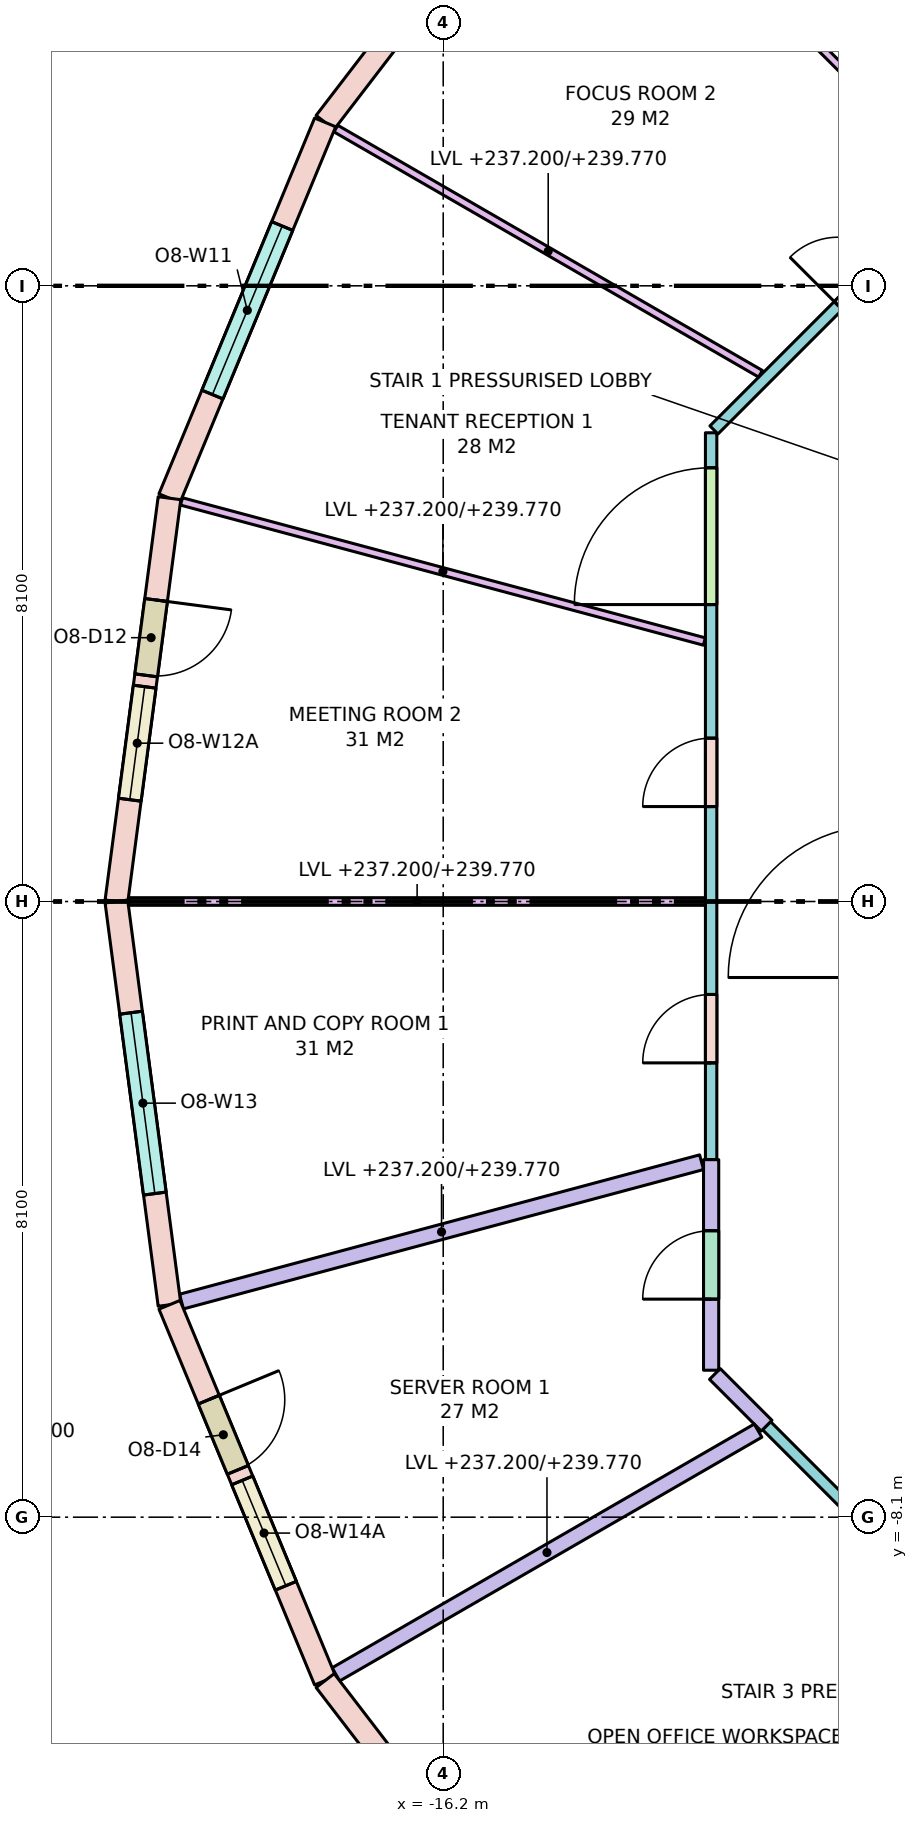
"""IFC4 building model, lengths in metres.
Left out: names, types, materials, properties, quantities, classifications, styles, units other than length and angle.
Written with IfcOpenShell. Run it as: python <this file> out.ifc"""

import sys

from ifc_helpers import new_model, si_unit, direction, frame, frame_2d, origin, place, context, subcontext, project, spatial, rectangle, extrude, element, fill, save


model = new_model("IFC4")
c1 = context("Model", 3, precision=1e-05, world=origin(), true_north=direction((0.0, 1.0)))
c2 = subcontext(c1, "Body", "Model", "MODEL_VIEW")
j1 = project(units=[si_unit("LENGTHUNIT", "METRE"), si_unit("PLANEANGLEUNIT", "RADIAN")], contexts=[c1])
p1 = place(None, origin())
s1 = spatial("IfcSite", under=j1, at=p1, CompositionType="ELEMENT")
p2 = place(p1, origin())
s2 = spatial("IfcBuilding", under=s1, at=p2, CompositionType="ELEMENT")
p3 = place(p2, frame((0.0, 0.0, 237.2)))
s3 = spatial("IfcBuildingStorey", under=s2, at=p3, CompositionType="ELEMENT", Elevation=237.2)
p4 = place(p3, frame((-14.496, 14.496, 0.0), z_axis=(0.0, 0.0, 1.0), x_axis=(-0.60876670321, -0.793349293227, 0.0)))
e1 = element("IfcWall", 1, at=p4, inside=s3, PredefinedType="STANDARD", context=c2, shape_type="SweptSolid", body=[
    extrude(rectangle(XDim=5.352, YDim=0.3, at=frame_2d((2.676, 0.0))), origin(), (0.0, 0.0, 1.0), 3.42),
])
p5 = place(p4, frame((1.351, 0.0, 0.0)))
e2 = element("IfcOpeningElement", 2, at=p5, cuts=e1, PredefinedType="OPENING", context=c2, shape_type="SweptSolid", body=[
    extrude(rectangle(XDim=1.0, YDim=2.4, at=frame_2d((0.5, 1.2))), frame((0.0, 0.16, 0.0), z_axis=(0.0, -1.0, 0.0), x_axis=(1.0, 0.0, 0.0)), (0.0, 0.0, 1.0), 0.32),
])
p6 = place(p4, frame((2.501, 0.0, 0.8)))
e3 = element("IfcOpeningElement", 3, at=p6, cuts=e1, PredefinedType="OPENING", context=c2, shape_type="SweptSolid", body=[
    extrude(rectangle(XDim=1.5, YDim=2.4, at=frame_2d((0.75, 1.2))), frame((0.0, 0.16, 0.0), z_axis=(0.0, -1.0, 0.0), x_axis=(1.0, 0.0, 0.0)), (0.0, 0.0, 1.0), 0.32),
])
p7 = place(p3, frame((-17.753, 10.25, 0.0), z_axis=(0.0, 0.0, 1.0), x_axis=(-0.382713071139, -0.923867255172, 0.0)))
e4 = element("IfcWall", 4, at=p7, inside=s3, PredefinedType="STANDARD", context=c2, shape_type="SweptSolid", body=[
    extrude(rectangle(XDim=5.352, YDim=0.3, at=frame_2d((2.676, 0.0))), origin(), (0.0, 0.0, 1.0), 3.42),
])
p8 = place(p7, frame((1.476, 0.0, 0.8)))
e5 = element("IfcOpeningElement", 5, at=p8, cuts=e4, PredefinedType="OPENING", context=c2, shape_type="SweptSolid", body=[
    extrude(rectangle(XDim=2.4, YDim=2.4, at=frame_2d((1.2, 1.2))), frame((0.0, 0.16, 0.0), z_axis=(0.0, -1.0, 0.0), x_axis=(1.0, 0.0, 0.0)), (0.0, 0.0, 1.0), 0.32),
])
p9 = place(p3, frame((-19.802, 5.306, 0.0), z_axis=(0.0, 0.0, 1.0), x_axis=(-0.130517056518, -0.991446064069, 0.0)))
e6 = element("IfcWall", 6, at=p9, inside=s3, PredefinedType="STANDARD", context=c2, shape_type="SweptSolid", body=[
    extrude(rectangle(XDim=5.352, YDim=0.3, at=frame_2d((2.676, 0.0))), origin(), (0.0, 0.0, 1.0), 3.42),
])
p10 = place(p9, frame((1.351, 0.0, 0.0)))
e7 = element("IfcOpeningElement", 7, at=p10, cuts=e6, PredefinedType="OPENING", context=c2, shape_type="SweptSolid", body=[
    extrude(rectangle(XDim=1.0, YDim=2.4, at=frame_2d((0.5, 1.2))), frame((0.0, 0.16, 0.0), z_axis=(0.0, -1.0, 0.0), x_axis=(1.0, 0.0, 0.0)), (0.0, 0.0, 1.0), 0.32),
])
p11 = place(p9, frame((2.501, 0.0, 0.8)))
e8 = element("IfcOpeningElement", 8, at=p11, cuts=e6, PredefinedType="OPENING", context=c2, shape_type="SweptSolid", body=[
    extrude(rectangle(XDim=1.5, YDim=2.4, at=frame_2d((0.75, 1.2))), frame((0.0, 0.16, 0.0), z_axis=(0.0, -1.0, 0.0), x_axis=(1.0, 0.0, 0.0)), (0.0, 0.0, 1.0), 0.32),
])
p12 = place(p3, frame((-20.5, 0.0, 0.0), z_axis=(0.0, 0.0, 1.0), x_axis=(0.130517056518, -0.991446064069, 0.0)))
e9 = element("IfcWall", 9, at=p12, inside=s3, PredefinedType="STANDARD", context=c2, shape_type="SweptSolid", body=[
    extrude(rectangle(XDim=5.352, YDim=0.3, at=frame_2d((2.676, 0.0))), origin(), (0.0, 0.0, 1.0), 3.42),
])
p13 = place(p12, frame((1.476, 0.0, 0.8)))
e10 = element("IfcOpeningElement", 10, at=p13, cuts=e9, PredefinedType="OPENING", context=c2, shape_type="SweptSolid", body=[
    extrude(rectangle(XDim=2.4, YDim=2.4, at=frame_2d((1.2, 1.2))), frame((0.0, 0.16, 0.0), z_axis=(0.0, -1.0, 0.0), x_axis=(1.0, 0.0, 0.0)), (0.0, 0.0, 1.0), 0.32),
])
p14 = place(p3, frame((-19.802, -5.306, 0.0), z_axis=(0.0, 0.0, 1.0), x_axis=(0.382713071139, -0.923867255172, 0.0)))
e11 = element("IfcWall", 11, at=p14, inside=s3, PredefinedType="STANDARD", context=c2, shape_type="SweptSolid", body=[
    extrude(rectangle(XDim=5.352, YDim=0.3, at=frame_2d((2.676, 0.0))), origin(), (0.0, 0.0, 1.0), 3.42),
])
p15 = place(p14, frame((1.351, 0.0, 0.0)))
e12 = element("IfcOpeningElement", 12, at=p15, cuts=e11, PredefinedType="OPENING", context=c2, shape_type="SweptSolid", body=[
    extrude(rectangle(XDim=1.0, YDim=2.4, at=frame_2d((0.5, 1.2))), frame((0.0, 0.16, 0.0), z_axis=(0.0, -1.0, 0.0), x_axis=(1.0, 0.0, 0.0)), (0.0, 0.0, 1.0), 0.32),
])
p16 = place(p14, frame((2.501, 0.0, 0.8)))
e13 = element("IfcOpeningElement", 13, at=p16, cuts=e11, PredefinedType="OPENING", context=c2, shape_type="SweptSolid", body=[
    extrude(rectangle(XDim=1.5, YDim=2.4, at=frame_2d((0.75, 1.2))), frame((0.0, 0.16, 0.0), z_axis=(0.0, -1.0, 0.0), x_axis=(1.0, 0.0, 0.0)), (0.0, 0.0, 1.0), 0.32),
])
p17 = place(p3, frame((-17.753, -10.25, 0.0), z_axis=(0.0, 0.0, 1.0), x_axis=(0.60876670321, -0.793349293227, 0.0)))
e14 = element("IfcWall", 14, at=p17, inside=s3, PredefinedType="STANDARD", context=c2, shape_type="SweptSolid", body=[
    extrude(rectangle(XDim=5.352, YDim=0.3, at=frame_2d((2.676, 0.0))), origin(), (0.0, 0.0, 1.0), 3.42),
])
p18 = place(p17, frame((1.476, 0.0, 0.8)))
e15 = element("IfcOpeningElement", 15, at=p18, cuts=e14, PredefinedType="OPENING", context=c2, shape_type="SweptSolid", body=[
    extrude(rectangle(XDim=2.4, YDim=2.4, at=frame_2d((1.2, 1.2))), frame((0.0, 0.16, 0.0), z_axis=(0.0, -1.0, 0.0), x_axis=(1.0, 0.0, 0.0)), (0.0, 0.0, 1.0), 0.32),
])
p19 = place(p3, frame((-8.204, -10.638, 0.0), z_axis=(0.0, 0.0, 1.0), x_axis=(-0.707106781187, 0.707106781187, 0.0)))
e16 = element("IfcWall", 16, at=p19, inside=s3, PredefinedType="PARTITIONING", context=c2, shape_type="SweptSolid", body=[
    extrude(rectangle(XDim=5.291, YDim=0.15, at=frame_2d((2.646, 0.0))), origin(), (0.0, 0.0, 1.0), 2.57),
])
p20 = place(p3, frame((-11.945, -6.896, 0.0), z_axis=(0.0, 0.0, 1.0), x_axis=(-0.707106781187, 0.707106781187, 0.0)))
e17 = element("IfcWall", 17, at=p20, inside=s3, PredefinedType="PARTITIONING", context=c2, shape_type="SweptSolid", body=[
    extrude(rectangle(XDim=0.962, YDim=0.2, at=frame_2d((0.481, 0.0))), origin(), (0.0, 0.0, 1.0), 2.57),
])
p21 = place(p3, frame((-12.675, -6.167, 0.0), z_axis=(0.0, 0.0, 1.0), x_axis=(0.0, 1.0, 0.0)))
e18 = element("IfcWall", 18, at=p21, inside=s3, PredefinedType="PARTITIONING", context=c2, shape_type="SweptSolid", body=[
    extrude(rectangle(XDim=2.77, YDim=0.2, at=frame_2d((1.385, 0.0))), origin(), (0.0, 0.0, 1.0), 2.57),
])
p22 = place(p21, frame((0.935, 0.0, 0.0)))
e19 = element("IfcOpeningElement", 19, at=p22, cuts=e18, PredefinedType="OPENING", context=c2, shape_type="SweptSolid", body=[
    extrude(rectangle(XDim=0.9, YDim=2.1, at=frame_2d((0.45, 1.05))), frame((0.0, 0.11, 0.0), z_axis=(0.0, -1.0, 0.0), x_axis=(1.0, 0.0, 0.0)), (0.0, 0.0, 1.0), 0.22),
])
p23 = place(p3, frame((-12.675, -3.396, 0.0), z_axis=(0.0, 0.0, 1.0), x_axis=(0.0, 1.0, 0.0)))
e20 = element("IfcWall", 20, at=p23, inside=s3, PredefinedType="PARTITIONING", context=c2, shape_type="SweptSolid", body=[
    extrude(rectangle(XDim=9.563, YDim=0.15, at=frame_2d((4.781, 0.0))), origin(), (0.0, 0.0, 1.0), 2.57),
])
p24 = place(p23, frame((7.303, 0.0, 0.0)))
e21 = element("IfcOpeningElement", 21, at=p24, cuts=e20, PredefinedType="OPENING", context=c2, shape_type="SweptSolid", body=[
    extrude(rectangle(XDim=1.8, YDim=2.1, at=frame_2d((0.9, 1.05))), frame((0.0, 0.085, 0.0), z_axis=(0.0, -1.0, 0.0), x_axis=(1.0, 0.0, 0.0)), (0.0, 0.0, 1.0), 0.17),
])
p25 = place(p23, frame((4.645, 0.0, 0.0)))
e22 = element("IfcOpeningElement", 22, at=p25, cuts=e20, PredefinedType="OPENING", context=c2, shape_type="SweptSolid", body=[
    extrude(rectangle(XDim=0.9, YDim=2.1, at=frame_2d((0.45, 1.05))), frame((0.0, 0.085, 0.0), z_axis=(0.0, -1.0, 0.0), x_axis=(1.0, 0.0, 0.0)), (0.0, 0.0, 1.0), 0.17),
])
p26 = place(p23, frame((1.273, 0.0, 0.0)))
e23 = element("IfcOpeningElement", 23, at=p26, cuts=e20, PredefinedType="OPENING", context=c2, shape_type="SweptSolid", body=[
    extrude(rectangle(XDim=0.9, YDim=2.1, at=frame_2d((0.45, 1.05))), frame((0.0, 0.085, 0.0), z_axis=(0.0, -1.0, 0.0), x_axis=(1.0, 0.0, 0.0)), (0.0, 0.0, 1.0), 0.17),
])
p27 = place(p3, frame((-12.638, 6.204, 0.0), z_axis=(0.0, 0.0, 1.0), x_axis=(0.707106781187, 0.707106781187, 0.0)))
e24 = element("IfcWall", 24, at=p27, inside=s3, PredefinedType="PARTITIONING", context=c2, shape_type="SweptSolid", body=[
    extrude(rectangle(XDim=6.271, YDim=0.15, at=frame_2d((3.135, 0.0))), origin(), (0.0, 0.0, 1.0), 2.57),
])
p28 = place(p27, frame((4.935, 0.0, 0.0)))
e25 = element("IfcOpeningElement", 25, at=p28, cuts=e24, PredefinedType="OPENING", context=c2, shape_type="SweptSolid", body=[
    extrude(rectangle(XDim=0.9, YDim=2.1, at=frame_2d((0.45, 1.05))), frame((0.0, 0.085, 0.0), z_axis=(0.0, -1.0, 0.0), x_axis=(1.0, 0.0, 0.0)), (0.0, 0.0, 1.0), 0.17),
])
p29 = place(p27, frame((2.314, 0.0, 0.0)))
e26 = element("IfcOpeningElement", 26, at=p29, cuts=e24, PredefinedType="OPENING", context=c2, shape_type="SweptSolid", body=[
    extrude(rectangle(XDim=0.9, YDim=2.1, at=frame_2d((0.45, 1.05))), frame((0.0, 0.085, 0.0), z_axis=(0.0, -1.0, 0.0), x_axis=(1.0, 0.0, 0.0)), (0.0, 0.0, 1.0), 0.17),
])
p30 = place(p3, frame((-9.474, 9.474, 0.0), z_axis=(0.0, 0.0, 1.0), x_axis=(-0.707106781187, 0.707106781187, 0.0)))
e27 = element("IfcWall", 27, at=p30, inside=s3, PredefinedType="PARTITIONING", context=c2, shape_type="SweptSolid", body=[
    extrude(rectangle(XDim=6.938, YDim=0.1, at=frame_2d((3.469, 0.0))), origin(), (0.0, 0.0, 1.0), 2.57),
])
p31 = place(p3, frame((-12.025, 6.943, 0.0), z_axis=(0.0, 0.0, 1.0), x_axis=(-0.866026773083, 0.499997628298, 0.0)))
e28 = element("IfcWall", 28, at=p31, inside=s3, PredefinedType="PARTITIONING", context=c2, shape_type="SweptSolid", body=[
    extrude(rectangle(XDim=6.451, YDim=0.1, at=frame_2d((3.226, 0.0))), origin(), (0.0, 0.0, 1.0), 2.57),
])
p32 = place(p3, frame((-12.764, 3.42, 0.0), z_axis=(0.0, 0.0, 1.0), x_axis=(-0.965928160208, 0.258810334643, 0.0)))
e29 = element("IfcWall", 29, at=p32, inside=s3, PredefinedType="PARTITIONING", context=c2, shape_type="SweptSolid", body=[
    extrude(rectangle(XDim=7.122, YDim=0.1, at=frame_2d((3.561, 0.0))), origin(), (0.0, 0.0, 1.0), 2.57),
])
p33 = place(p3, frame((-12.75, 0.0, 0.0), z_axis=(0.0, 0.0, 1.0), x_axis=(-1.0, 0.0, 0.0)))
e30 = element("IfcWall", 30, at=p33, inside=s3, PredefinedType="PARTITIONING", context=c2, shape_type="SweptSolid", body=[
    extrude(rectangle(XDim=7.587, YDim=0.1, at=frame_2d((3.793, 0.0))), origin(), (0.0, 0.0, 1.0), 2.57),
])
p34 = place(p3, frame((-12.801, -3.43, 0.0), z_axis=(0.0, 0.0, 1.0), x_axis=(-0.965931131848, -0.258799243674, 0.0)))
e31 = element("IfcWall", 31, at=p34, inside=s3, PredefinedType="PARTITIONING", context=c2, shape_type="SweptSolid", body=[
    extrude(rectangle(XDim=7.085, YDim=0.2, at=frame_2d((3.542, 0.0))), origin(), (0.0, 0.0, 1.0), 2.57),
])
p35 = place(p3, frame((-12.058, -6.961, 0.0), z_axis=(0.0, 0.0, 1.0), x_axis=(-0.866013799398, -0.500020098848, 0.0)))
e32 = element("IfcWall", 32, at=p35, inside=s3, PredefinedType="PARTITIONING", context=c2, shape_type="SweptSolid", body=[
    extrude(rectangle(XDim=6.414, YDim=0.2, at=frame_2d((3.207, 0.0))), origin(), (0.0, 0.0, 1.0), 2.57),
])
p36 = place(p8, origin())
e33 = element("IfcWindow", 33, at=p36, inside=s3, PartitioningType="SINGLE_PANEL", PredefinedType="WINDOW", context=c2, shape_type="SweptSolid", body=[
    extrude(rectangle(XDim=2.4, YDim=2.4, at=frame_2d((1.2, 1.2))), frame((0.0, 0.03, 0.0), z_axis=(0.0, -1.0, 0.0), x_axis=(1.0, 0.0, 0.0)), (0.0, 0.0, 1.0), 0.06),
])
fill(e5, e33)
p37 = place(p10, origin())
e34 = element("IfcDoor", 34, at=p37, inside=s3, OperationType="SINGLE_SWING_LEFT", PredefinedType="DOOR", context=c2, shape_type="SweptSolid", body=[
    extrude(rectangle(XDim=1.0, YDim=2.4, at=frame_2d((0.5, 1.2))), frame((0.0, 0.025, 0.0), z_axis=(0.0, -1.0, 0.0), x_axis=(1.0, 0.0, 0.0)), (0.0, 0.0, 1.0), 0.05),
])
fill(e7, e34)
p38 = place(p11, origin())
e35 = element("IfcWindow", 35, at=p38, inside=s3, PartitioningType="SINGLE_PANEL", PredefinedType="WINDOW", context=c2, shape_type="SweptSolid", body=[
    extrude(rectangle(XDim=1.5, YDim=2.4, at=frame_2d((0.75, 1.2))), frame((0.0, 0.03, 0.0), z_axis=(0.0, -1.0, 0.0), x_axis=(1.0, 0.0, 0.0)), (0.0, 0.0, 1.0), 0.06),
])
fill(e8, e35)
p39 = place(p13, origin())
e36 = element("IfcWindow", 36, at=p39, inside=s3, PartitioningType="SINGLE_PANEL", PredefinedType="WINDOW", context=c2, shape_type="SweptSolid", body=[
    extrude(rectangle(XDim=2.4, YDim=2.4, at=frame_2d((1.2, 1.2))), frame((0.0, 0.03, 0.0), z_axis=(0.0, -1.0, 0.0), x_axis=(1.0, 0.0, 0.0)), (0.0, 0.0, 1.0), 0.06),
])
fill(e10, e36)
p40 = place(p15, origin())
e37 = element("IfcDoor", 37, at=p40, inside=s3, OperationType="SINGLE_SWING_LEFT", PredefinedType="DOOR", context=c2, shape_type="SweptSolid", body=[
    extrude(rectangle(XDim=1.0, YDim=2.4, at=frame_2d((0.5, 1.2))), frame((0.0, 0.025, 0.0), z_axis=(0.0, -1.0, 0.0), x_axis=(1.0, 0.0, 0.0)), (0.0, 0.0, 1.0), 0.05),
])
fill(e12, e37)
p41 = place(p16, origin())
e38 = element("IfcWindow", 38, at=p41, inside=s3, PartitioningType="SINGLE_PANEL", PredefinedType="WINDOW", context=c2, shape_type="SweptSolid", body=[
    extrude(rectangle(XDim=1.5, YDim=2.4, at=frame_2d((0.75, 1.2))), frame((0.0, 0.03, 0.0), z_axis=(0.0, -1.0, 0.0), x_axis=(1.0, 0.0, 0.0)), (0.0, 0.0, 1.0), 0.06),
])
fill(e13, e38)
p42 = place(p29, origin())
e39 = element("IfcDoor", 39, at=p42, inside=s3, OperationType="SINGLE_SWING_LEFT", PredefinedType="DOOR", context=c2, shape_type="SweptSolid", body=[
    extrude(rectangle(XDim=0.9, YDim=2.1, at=frame_2d((0.45, 1.05))), frame((0.0, 0.025, 0.0), z_axis=(0.0, -1.0, 0.0), x_axis=(1.0, 0.0, 0.0)), (0.0, 0.0, 1.0), 0.05),
])
fill(e26, e39)
p43 = place(p24, origin())
e40 = element("IfcDoor", 40, at=p43, inside=s3, OperationType="DOUBLE_DOOR_SINGLE_SWING", PredefinedType="DOOR", context=c2, shape_type="SweptSolid", body=[
    extrude(rectangle(XDim=1.8, YDim=2.1, at=frame_2d((0.9, 1.05))), frame((0.0, 0.025, 0.0), z_axis=(0.0, -1.0, 0.0), x_axis=(1.0, 0.0, 0.0)), (0.0, 0.0, 1.0), 0.05),
])
fill(e21, e40)
p44 = place(p25, origin())
e41 = element("IfcDoor", 41, at=p44, inside=s3, OperationType="SINGLE_SWING_LEFT", PredefinedType="DOOR", context=c2, shape_type="SweptSolid", body=[
    extrude(rectangle(XDim=0.9, YDim=2.1, at=frame_2d((0.45, 1.05))), frame((0.0, 0.025, 0.0), z_axis=(0.0, -1.0, 0.0), x_axis=(1.0, 0.0, 0.0)), (0.0, 0.0, 1.0), 0.05),
])
fill(e22, e41)
p45 = place(p26, origin())
e42 = element("IfcDoor", 42, at=p45, inside=s3, OperationType="SINGLE_SWING_LEFT", PredefinedType="DOOR", context=c2, shape_type="SweptSolid", body=[
    extrude(rectangle(XDim=0.9, YDim=2.1, at=frame_2d((0.45, 1.05))), frame((0.0, 0.025, 0.0), z_axis=(0.0, -1.0, 0.0), x_axis=(1.0, 0.0, 0.0)), (0.0, 0.0, 1.0), 0.05),
])
fill(e23, e42)
p46 = place(p22, origin())
e43 = element("IfcDoor", 43, at=p46, inside=s3, OperationType="SINGLE_SWING_LEFT", PredefinedType="DOOR", context=c2, shape_type="SweptSolid", body=[
    extrude(rectangle(XDim=0.9, YDim=2.1, at=frame_2d((0.45, 1.05))), frame((0.0, 0.025, 0.0), z_axis=(0.0, -1.0, 0.0), x_axis=(1.0, 0.0, 0.0)), (0.0, 0.0, 1.0), 0.05),
])
fill(e19, e43)
save(model, sys.argv[1])
